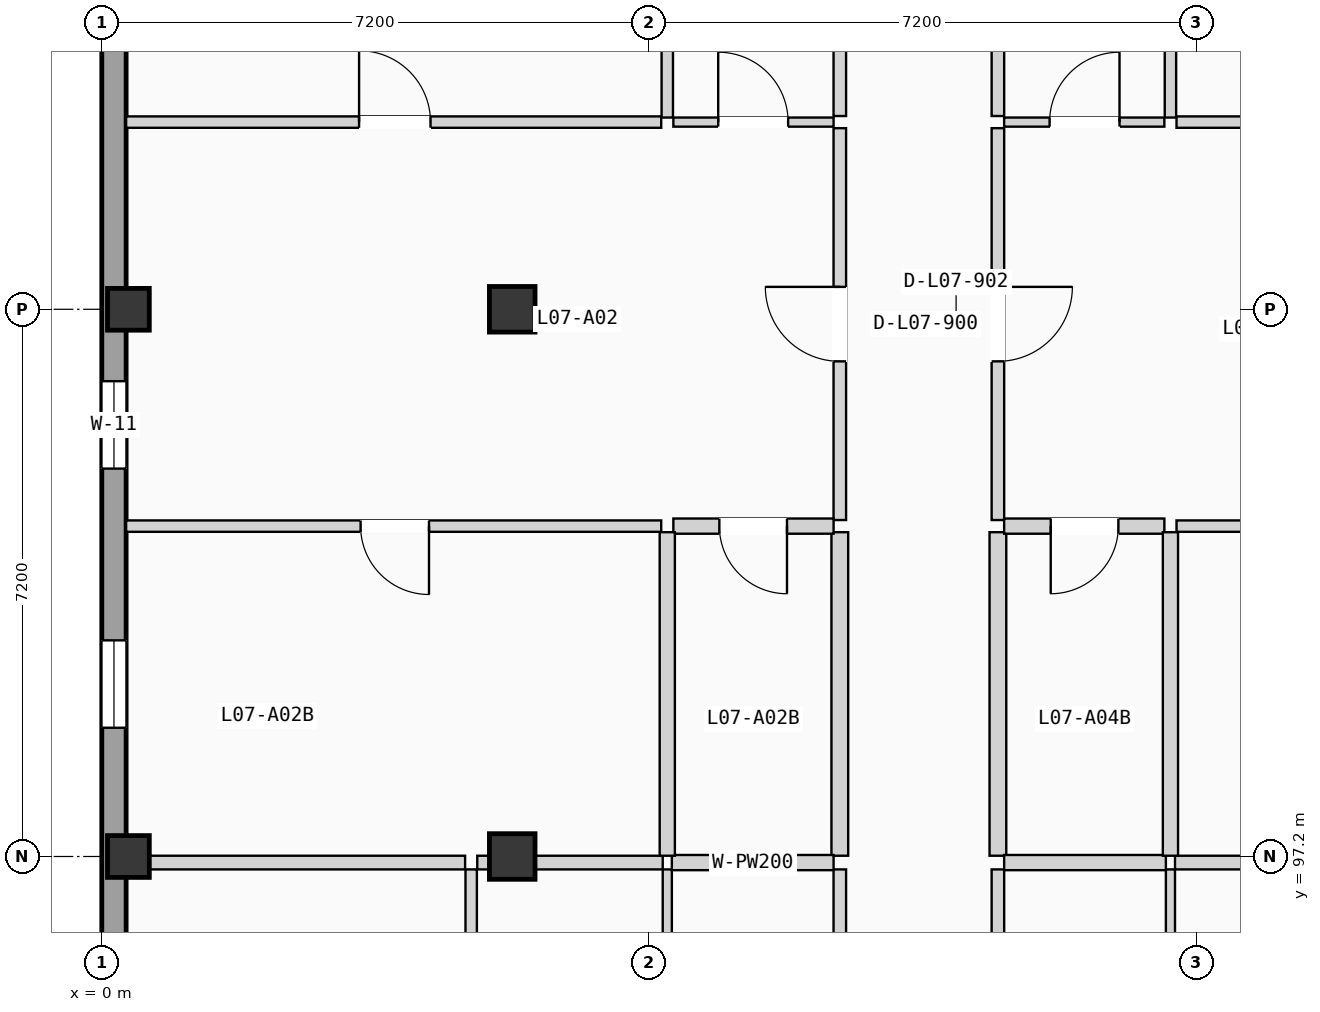
"""IFC4 building model, lengths in metres.
Left out: names, types, materials, properties, quantities, classifications, styles, units other than length and angle.
Written with IfcOpenShell. Run it as: python <this file> out.ifc"""

import sys

from ifc_helpers import new_model, si_unit, direction, frame, frame_2d, origin, origin_2d, place, context, subcontext, project, spatial, rectangle, extrude, element, fill, save


model = new_model("IFC4")
c1 = context("Model", 3, precision=1e-05, world=origin(), true_north=direction((0.0, 1.0)))
c2 = subcontext(c1, "Body", "Model", "MODEL_VIEW")
j1 = project(units=[si_unit("LENGTHUNIT", "METRE"), si_unit("PLANEANGLEUNIT", "RADIAN")], contexts=[c1])
p1 = place(None, origin())
s1 = spatial("IfcSite", under=j1, at=p1, CompositionType="ELEMENT")
p2 = place(p1, origin())
s2 = spatial("IfcBuilding", under=s1, at=p2, CompositionType="ELEMENT")
p3 = place(p2, frame((0.0, 0.0, 24.675)))
s3 = spatial("IfcBuildingStorey", under=s2, at=p3, CompositionType="ELEMENT", Elevation=24.675)
for number, where, z_axis, x_axis in (
    (1, (0.35, 97.2, 0.0), (0.0, 0.0, 1.0), (1.0, 0.0, 0.0)),
    (2, (0.35, 104.4, 0.0), (0.0, 0.0, 1.0), (1.0, 0.0, 0.0)),
):
    element("IfcColumn", number, at=place(p3, frame(where, z_axis=z_axis, x_axis=x_axis)), inside=s3, PredefinedType="COLUMN", context=c2, shape_type="SweptSolid", body=[
        extrude(rectangle(XDim=0.55, YDim=0.55, at=origin_2d()), origin(), (0.0, 0.0, 1.0), 3.15),
    ])
for number, where, z_axis, x_axis in (
    (3, (5.4, 97.2, 0.0), (0.0, 0.0, 1.0), (1.0, 0.0, 0.0)),
    (4, (5.4, 104.4, 0.0), (0.0, 0.0, 1.0), (1.0, 0.0, 0.0)),
):
    element("IfcColumn", number, at=place(p3, frame(where, z_axis=z_axis, x_axis=x_axis)), inside=s3, PredefinedType="COLUMN", context=c2, shape_type="SweptSolid", body=[
        extrude(rectangle(XDim=0.6, YDim=0.6, at=origin_2d()), origin(), (0.0, 0.0, 1.0), 3.15),
    ])
p4 = place(p3, frame((0.16, 68.72, 0.0), z_axis=(0.0, 0.0, 1.0), x_axis=(0.0, 1.0, 0.0)))
e5 = element("IfcWall", 5, at=p4, inside=s3, PredefinedType="SOLIDWALL", context=c2, shape_type="SweptSolid", body=[
    extrude(rectangle(XDim=49.76, YDim=0.32, at=frame_2d((24.88, 0.0))), origin(), (0.0, 0.0, 1.0), 2.9),
])
p5 = place(p4, frame((17.155, 0.0, 0.715)))
e6 = element("IfcOpeningElement", 6, at=p5, cuts=e5, PredefinedType="OPENING", context=c2, shape_type="SweptSolid", body=[
    extrude(rectangle(XDim=1.05, YDim=1.5, at=frame_2d((0.525, 0.75))), frame((0.0, 0.17, 0.0), z_axis=(0.0, -1.0, 0.0), x_axis=(1.0, 0.0, 0.0)), (0.0, 0.0, 1.0), 0.34),
])
p6 = place(p4, frame((10.02, 0.0, 0.565)))
e7 = element("IfcOpeningElement", 7, at=p6, cuts=e5, PredefinedType="OPENING", context=c2, shape_type="SweptSolid", body=[
    extrude(rectangle(XDim=1.05, YDim=1.65, at=frame_2d((0.525, 0.825))), frame((0.0, 0.17, 0.0), z_axis=(0.0, -1.0, 0.0), x_axis=(1.0, 0.0, 0.0)), (0.0, 0.0, 1.0), 0.34),
])
p7 = place(p4, frame((24.405, 0.0, 0.85)))
e8 = element("IfcOpeningElement", 8, at=p7, cuts=e5, PredefinedType="OPENING", context=c2, shape_type="SweptSolid", body=[
    extrude(rectangle(XDim=0.95, YDim=1.2, at=frame_2d((0.475, 0.6))), frame((0.0, 0.17, 0.0), z_axis=(0.0, -1.0, 0.0), x_axis=(1.0, 0.0, 0.0)), (0.0, 0.0, 1.0), 0.34),
])
p8 = place(p4, frame((33.584, 0.0, 0.9)))
e9 = element("IfcOpeningElement", 9, at=p8, cuts=e5, PredefinedType="OPENING", context=c2, shape_type="SweptSolid", body=[
    extrude(rectangle(XDim=1.15, YDim=1.2, at=frame_2d((0.575, 0.6))), frame((0.0, 0.17, 0.0), z_axis=(0.0, -1.0, 0.0), x_axis=(1.0, 0.0, 0.0)), (0.0, 0.0, 1.0), 0.34),
])
p9 = place(p4, frame((30.174, 0.0, 0.865)))
e10 = element("IfcOpeningElement", 10, at=p9, cuts=e5, PredefinedType="OPENING", context=c2, shape_type="SweptSolid", body=[
    extrude(rectangle(XDim=1.15, YDim=1.35, at=frame_2d((0.575, 0.675))), frame((0.0, 0.17, 0.0), z_axis=(0.0, -1.0, 0.0), x_axis=(1.0, 0.0, 0.0)), (0.0, 0.0, 1.0), 0.34),
])
p10 = place(p4, frame((39.776, 0.0, 0.715)))
e11 = element("IfcOpeningElement", 11, at=p10, cuts=e5, PredefinedType="OPENING", context=c2, shape_type="SweptSolid", body=[
    extrude(rectangle(XDim=1.15, YDim=1.5, at=frame_2d((0.575, 0.75))), frame((0.0, 0.17, 0.0), z_axis=(0.0, -1.0, 0.0), x_axis=(1.0, 0.0, 0.0)), (0.0, 0.0, 1.0), 0.34),
])
p11 = place(p3, frame((9.71, 89.13, 0.0), z_axis=(0.0, 0.0, 1.0), x_axis=(0.0, 1.0, 0.0)))
e12 = element("IfcWall", 12, at=p11, inside=s3, PredefinedType="PARTITIONING", context=c2, shape_type="SweptSolid", body=[
    extrude(rectangle(XDim=7.9, YDim=0.165, at=frame_2d((3.95, 0.0))), origin(), (0.0, 0.0, 1.0), 2.87),
])
p12 = place(p3, frame((9.71, 101.627, 0.0), z_axis=(0.0, 0.0, 1.0), x_axis=(0.0, 1.0, 0.0)))
e13 = element("IfcWall", 13, at=p12, inside=s3, PredefinedType="PARTITIONING", context=c2, shape_type="SweptSolid", body=[
    extrude(rectangle(XDim=5.156, YDim=0.165, at=frame_2d((2.578, 0.0))), origin(), (0.0, 0.0, 1.0), 2.87),
])
p13 = place(p12, frame((2.088, 0.0, 0.0)))
e14 = element("IfcOpeningElement", 14, at=p13, cuts=e13, PredefinedType="OPENING", context=c2, shape_type="SweptSolid", body=[
    extrude(rectangle(XDim=0.98, YDim=2.08, at=frame_2d((0.49, 1.04))), frame((0.0, 0.093, 0.0), z_axis=(0.0, -1.0, 0.0), x_axis=(1.0, 0.0, 0.0)), (0.0, 0.0, 1.0), 0.185),
])
p14 = place(p3, frame((9.71, 97.21, 0.0), z_axis=(0.0, 0.0, 1.0), x_axis=(0.0, 1.0, 0.0)))
e15 = element("IfcWall", 15, at=p14, inside=s3, PredefinedType="PLUMBINGWALL", context=c2, shape_type="SweptSolid", body=[
    extrude(rectangle(XDim=4.257, YDim=0.22, at=frame_2d((2.128, 0.0))), origin(), (0.0, 0.0, 1.0), 2.87),
])
p15 = place(p3, frame((9.71, 106.943, 0.0), z_axis=(0.0, 0.0, 1.0), x_axis=(0.0, 1.0, 0.0)))
e16 = element("IfcWall", 16, at=p15, inside=s3, PredefinedType="PARTITIONING", context=c2, shape_type="SweptSolid", body=[
    extrude(rectangle(XDim=4.257, YDim=0.165, at=frame_2d((2.128, 0.0))), origin(), (0.0, 0.0, 1.0), 2.87),
])
p16 = place(p3, frame((11.79, 89.13, 0.0), z_axis=(0.0, 0.0, 1.0), x_axis=(0.0, 1.0, 0.0)))
e17 = element("IfcWall", 17, at=p16, inside=s3, PredefinedType="PARTITIONING", context=c2, shape_type="SweptSolid", body=[
    extrude(rectangle(XDim=7.9, YDim=0.165, at=frame_2d((3.95, 0.0))), origin(), (0.0, 0.0, 1.0), 2.87),
])
p17 = place(p3, frame((11.79, 101.627, 0.0), z_axis=(0.0, 0.0, 1.0), x_axis=(0.0, 1.0, 0.0)))
e18 = element("IfcWall", 18, at=p17, inside=s3, PredefinedType="PARTITIONING", context=c2, shape_type="SweptSolid", body=[
    extrude(rectangle(XDim=5.156, YDim=0.165, at=frame_2d((2.578, 0.0))), origin(), (0.0, 0.0, 1.0), 2.87),
])
p18 = place(p17, frame((2.088, 0.0, 0.0)))
e19 = element("IfcOpeningElement", 19, at=p18, cuts=e18, PredefinedType="OPENING", context=c2, shape_type="SweptSolid", body=[
    extrude(rectangle(XDim=0.98, YDim=2.08, at=frame_2d((0.49, 1.04))), frame((0.0, 0.093, 0.0), z_axis=(0.0, -1.0, 0.0), x_axis=(1.0, 0.0, 0.0)), (0.0, 0.0, 1.0), 0.185),
])
p19 = place(p3, frame((11.79, 97.21, 0.0), z_axis=(0.0, 0.0, 1.0), x_axis=(0.0, 1.0, 0.0)))
e20 = element("IfcWall", 20, at=p19, inside=s3, PredefinedType="PLUMBINGWALL", context=c2, shape_type="SweptSolid", body=[
    extrude(rectangle(XDim=4.257, YDim=0.22, at=frame_2d((2.128, 0.0))), origin(), (0.0, 0.0, 1.0), 2.87),
])
p20 = place(p3, frame((11.79, 106.943, 0.0), z_axis=(0.0, 0.0, 1.0), x_axis=(0.0, 1.0, 0.0)))
e21 = element("IfcWall", 21, at=p20, inside=s3, PredefinedType="PARTITIONING", context=c2, shape_type="SweptSolid", body=[
    extrude(rectangle(XDim=4.257, YDim=0.165, at=frame_2d((2.128, 0.0))), origin(), (0.0, 0.0, 1.0), 2.87),
])
p21 = place(p3, frame((7.44, 89.11, 0.0), z_axis=(0.0, 0.0, 1.0), x_axis=(0.0, 1.0, 0.0)))
e22 = element("IfcWall", 22, at=p21, inside=s3, PredefinedType="PARTITIONING", context=c2, shape_type="SweptSolid", body=[
    extrude(rectangle(XDim=7.92, YDim=0.12, at=frame_2d((3.96, 0.0))), origin(), (0.0, 0.0, 1.0), 2.87),
])
p22 = place(p3, frame((7.5, 97.12, 0.0), z_axis=(0.0, 0.0, 1.0), x_axis=(1.0, 0.0, 0.0)))
e23 = element("IfcWall", 23, at=p22, inside=s3, PredefinedType="PLUMBINGWALL", context=c2, shape_type="SweptSolid", body=[
    extrude(rectangle(XDim=2.128, YDim=0.2, at=frame_2d((1.064, 0.0))), origin(), (0.0, 0.0, 1.0), 2.17),
])
p23 = place(p3, frame((4.86, 89.11, 0.0), z_axis=(0.0, 0.0, 1.0), x_axis=(0.0, 1.0, 0.0)))
e24 = element("IfcWall", 24, at=p23, inside=s3, PredefinedType="PARTITIONING", context=c2, shape_type="SweptSolid", body=[
    extrude(rectangle(XDim=7.92, YDim=0.15, at=frame_2d((3.96, 0.0))), origin(), (0.0, 0.0, 1.0), 2.87),
])
p24 = place(p3, frame((0.32, 97.12, 0.0), z_axis=(0.0, 0.0, 1.0), x_axis=(1.0, 0.0, 0.0)))
e25 = element("IfcWall", 25, at=p24, inside=s3, PredefinedType="PARTITIONING", context=c2, shape_type="SweptSolid", body=[
    extrude(rectangle(XDim=4.46, YDim=0.18, at=frame_2d((2.23, 0.0))), origin(), (0.0, 0.0, 1.0), 2.22),
])
p25 = place(p3, frame((4.94, 97.12, 0.0), z_axis=(0.0, 0.0, 1.0), x_axis=(1.0, 0.0, 0.0)))
e26 = element("IfcWall", 26, at=p25, inside=s3, PredefinedType="PARTITIONING", context=c2, shape_type="SweptSolid", body=[
    extrude(rectangle(XDim=2.44, YDim=0.18, at=frame_2d((1.22, 0.0))), origin(), (0.0, 0.0, 1.0), 2.17),
])
p26 = place(p3, frame((7.52, 101.547, 0.0), z_axis=(0.0, 0.0, 1.0), x_axis=(1.0, 0.0, 0.0)))
e27 = element("IfcWall", 27, at=p26, inside=s3, PredefinedType="PLUMBINGWALL", context=c2, shape_type="SweptSolid", body=[
    extrude(rectangle(XDim=2.108, YDim=0.2, at=frame_2d((1.054, 0.0))), origin(), (0.0, 0.0, 1.0), 2.87),
])
p27 = place(p26, frame((0.605, 0.0, 0.0)))
e28 = element("IfcOpeningElement", 28, at=p27, cuts=e27, PredefinedType="OPENING", context=c2, shape_type="SweptSolid", body=[
    extrude(rectangle(XDim=0.89, YDim=2.03, at=frame_2d((0.445, 1.015))), frame((0.0, 0.11, 0.0), z_axis=(0.0, -1.0, 0.0), x_axis=(1.0, 0.0, 0.0)), (0.0, 0.0, 1.0), 0.22),
])
p28 = place(p3, frame((7.52, 106.863, 0.0), z_axis=(0.0, 0.0, 1.0), x_axis=(1.0, 0.0, 0.0)))
e29 = element("IfcWall", 29, at=p28, inside=s3, PredefinedType="PARTITIONING", context=c2, shape_type="SweptSolid", body=[
    extrude(rectangle(XDim=2.108, YDim=0.12, at=frame_2d((1.054, 0.0))), origin(), (0.0, 0.0, 1.0), 2.87),
])
p29 = place(p28, frame((0.59, 0.0, 0.0)))
e30 = element("IfcOpeningElement", 30, at=p29, cuts=e29, PredefinedType="OPENING", context=c2, shape_type="SweptSolid", body=[
    extrude(rectangle(XDim=0.92, YDim=2.02, at=frame_2d((0.46, 1.01))), frame((0.0, 0.07, 0.0), z_axis=(0.0, -1.0, 0.0), x_axis=(1.0, 0.0, 0.0)), (0.0, 0.0, 1.0), 0.14),
])
p30 = place(p3, frame((0.32, 101.547, 0.0), z_axis=(0.0, 0.0, 1.0), x_axis=(1.0, 0.0, 0.0)))
e31 = element("IfcWall", 31, at=p30, inside=s3, PredefinedType="PARTITIONING", context=c2, shape_type="SweptSolid", body=[
    extrude(rectangle(XDim=7.04, YDim=0.15, at=frame_2d((3.52, 0.0))), origin(), (0.0, 0.0, 1.0), 2.87),
])
p31 = place(p30, frame((3.085, 0.0, 0.0)))
e32 = element("IfcOpeningElement", 32, at=p31, cuts=e31, PredefinedType="OPENING", context=c2, shape_type="SweptSolid", body=[
    extrude(rectangle(XDim=0.9, YDim=2.04, at=frame_2d((0.45, 1.02))), frame((0.0, 0.085, 0.0), z_axis=(0.0, -1.0, 0.0), x_axis=(1.0, 0.0, 0.0)), (0.0, 0.0, 1.0), 0.17),
])
p32 = place(p3, frame((0.32, 106.863, 0.0), z_axis=(0.0, 0.0, 1.0), x_axis=(1.0, 0.0, 0.0)))
e33 = element("IfcWall", 33, at=p32, inside=s3, PredefinedType="PARTITIONING", context=c2, shape_type="SweptSolid", body=[
    extrude(rectangle(XDim=7.04, YDim=0.15, at=frame_2d((3.52, 0.0))), origin(), (0.0, 0.0, 1.0), 2.87),
])
p33 = place(p32, frame((3.065, 0.0, 0.0)))
e34 = element("IfcOpeningElement", 34, at=p33, cuts=e33, PredefinedType="OPENING", context=c2, shape_type="SweptSolid", body=[
    extrude(rectangle(XDim=0.94, YDim=2.06, at=frame_2d((0.47, 1.03))), frame((0.0, 0.085, 0.0), z_axis=(0.0, -1.0, 0.0), x_axis=(1.0, 0.0, 0.0)), (0.0, 0.0, 1.0), 0.17),
])
p34 = place(p3, frame((7.44, 97.21, 0.0), z_axis=(0.0, 0.0, 1.0), x_axis=(0.0, 1.0, 0.0)))
e35 = element("IfcWall", 35, at=p34, inside=s3, PredefinedType="PLUMBINGWALL", context=c2, shape_type="SweptSolid", body=[
    extrude(rectangle(XDim=4.257, YDim=0.2, at=frame_2d((2.128, 0.0))), origin(), (0.0, 0.0, 1.0), 2.87),
])
p35 = place(p3, frame((7.44, 106.923, 0.0), z_axis=(0.0, 0.0, 1.0), x_axis=(0.0, 1.0, 0.0)))
e36 = element("IfcWall", 36, at=p35, inside=s3, PredefinedType="PARTITIONING", context=c2, shape_type="SweptSolid", body=[
    extrude(rectangle(XDim=4.277, YDim=0.15, at=frame_2d((2.138, 0.0))), origin(), (0.0, 0.0, 1.0), 2.87),
])
p36 = place(p3, frame((14.06, 89.11, 0.0), z_axis=(0.0, 0.0, 1.0), x_axis=(0.0, 1.0, 0.0)))
e37 = element("IfcWall", 37, at=p36, inside=s3, PredefinedType="PARTITIONING", context=c2, shape_type="SweptSolid", body=[
    extrude(rectangle(XDim=7.92, YDim=0.12, at=frame_2d((3.96, 0.0))), origin(), (0.0, 0.0, 1.0), 2.87),
])
p37 = place(p3, frame((11.872, 97.12, 0.0), z_axis=(0.0, 0.0, 1.0), x_axis=(1.0, 0.0, 0.0)))
e38 = element("IfcWall", 38, at=p37, inside=s3, PredefinedType="PLUMBINGWALL", context=c2, shape_type="SweptSolid", body=[
    extrude(rectangle(XDim=2.128, YDim=0.2, at=frame_2d((1.064, 0.0))), origin(), (0.0, 0.0, 1.0), 2.17),
])
p38 = place(p3, frame((14.12, 97.12, 0.0), z_axis=(0.0, 0.0, 1.0), x_axis=(1.0, 0.0, 0.0)))
e39 = element("IfcWall", 39, at=p38, inside=s3, PredefinedType="PARTITIONING", context=c2, shape_type="SweptSolid", body=[
    extrude(rectangle(XDim=2.54, YDim=0.18, at=frame_2d((1.27, 0.0))), origin(), (0.0, 0.0, 1.0), 2.17),
])
p39 = place(p3, frame((11.872, 101.547, 0.0), z_axis=(0.0, 0.0, 1.0), x_axis=(1.0, 0.0, 0.0)))
e40 = element("IfcWall", 40, at=p39, inside=s3, PredefinedType="PLUMBINGWALL", context=c2, shape_type="SweptSolid", body=[
    extrude(rectangle(XDim=2.108, YDim=0.2, at=frame_2d((1.054, 0.0))), origin(), (0.0, 0.0, 1.0), 2.87),
])
p40 = place(p39, frame((0.613, 0.0, 0.0)))
e41 = element("IfcOpeningElement", 41, at=p40, cuts=e40, PredefinedType="OPENING", context=c2, shape_type="SweptSolid", body=[
    extrude(rectangle(XDim=0.89, YDim=2.03, at=frame_2d((0.445, 1.015))), frame((0.0, 0.11, 0.0), z_axis=(0.0, -1.0, 0.0), x_axis=(1.0, 0.0, 0.0)), (0.0, 0.0, 1.0), 0.22),
])
p41 = place(p3, frame((11.872, 106.863, 0.0), z_axis=(0.0, 0.0, 1.0), x_axis=(1.0, 0.0, 0.0)))
e42 = element("IfcWall", 42, at=p41, inside=s3, PredefinedType="PARTITIONING", context=c2, shape_type="SweptSolid", body=[
    extrude(rectangle(XDim=2.108, YDim=0.12, at=frame_2d((1.054, 0.0))), origin(), (0.0, 0.0, 1.0), 2.87),
])
p42 = place(p41, frame((0.598, 0.0, 0.0)))
e43 = element("IfcOpeningElement", 43, at=p42, cuts=e42, PredefinedType="OPENING", context=c2, shape_type="SweptSolid", body=[
    extrude(rectangle(XDim=0.92, YDim=2.02, at=frame_2d((0.46, 1.01))), frame((0.0, 0.07, 0.0), z_axis=(0.0, -1.0, 0.0), x_axis=(1.0, 0.0, 0.0)), (0.0, 0.0, 1.0), 0.14),
])
p43 = place(p3, frame((14.14, 101.547, 0.0), z_axis=(0.0, 0.0, 1.0), x_axis=(1.0, 0.0, 0.0)))
e44 = element("IfcWall", 44, at=p43, inside=s3, PredefinedType="PARTITIONING", context=c2, shape_type="SweptSolid", body=[
    extrude(rectangle(XDim=7.14, YDim=0.15, at=frame_2d((3.57, 0.0))), origin(), (0.0, 0.0, 1.0), 2.87),
])
p44 = place(p43, frame((3.015, 0.0, 0.0)))
e45 = element("IfcOpeningElement", 45, at=p44, cuts=e44, PredefinedType="OPENING", context=c2, shape_type="SweptSolid", body=[
    extrude(rectangle(XDim=1.08, YDim=2.1, at=frame_2d((0.54, 1.05))), frame((0.0, 0.085, 0.0), z_axis=(0.0, -1.0, 0.0), x_axis=(1.0, 0.0, 0.0)), (0.0, 0.0, 1.0), 0.17),
])
p45 = place(p3, frame((14.14, 106.863, 0.0), z_axis=(0.0, 0.0, 1.0), x_axis=(1.0, 0.0, 0.0)))
e46 = element("IfcWall", 46, at=p45, inside=s3, PredefinedType="PARTITIONING", context=c2, shape_type="SweptSolid", body=[
    extrude(rectangle(XDim=7.14, YDim=0.15, at=frame_2d((3.57, 0.0))), origin(), (0.0, 0.0, 1.0), 2.87),
])
p46 = place(p45, frame((3.105, 0.0, 0.0)))
e47 = element("IfcOpeningElement", 47, at=p46, cuts=e46, PredefinedType="OPENING", context=c2, shape_type="SweptSolid", body=[
    extrude(rectangle(XDim=0.9, YDim=2.04, at=frame_2d((0.45, 1.02))), frame((0.0, 0.085, 0.0), z_axis=(0.0, -1.0, 0.0), x_axis=(1.0, 0.0, 0.0)), (0.0, 0.0, 1.0), 0.17),
])
p47 = place(p3, frame((14.06, 97.21, 0.0), z_axis=(0.0, 0.0, 1.0), x_axis=(0.0, 1.0, 0.0)))
e48 = element("IfcWall", 48, at=p47, inside=s3, PredefinedType="PLUMBINGWALL", context=c2, shape_type="SweptSolid", body=[
    extrude(rectangle(XDim=4.257, YDim=0.2, at=frame_2d((2.128, 0.0))), origin(), (0.0, 0.0, 1.0), 2.87),
])
p48 = place(p3, frame((14.06, 106.923, 0.0), z_axis=(0.0, 0.0, 1.0), x_axis=(0.0, 1.0, 0.0)))
e49 = element("IfcWall", 49, at=p48, inside=s3, PredefinedType="PARTITIONING", context=c2, shape_type="SweptSolid", body=[
    extrude(rectangle(XDim=4.277, YDim=0.15, at=frame_2d((2.138, 0.0))), origin(), (0.0, 0.0, 1.0), 2.87),
])
p49 = place(p8, origin())
e50 = element("IfcWindow", 50, at=p49, inside=s3, PartitioningType="SINGLE_PANEL", PredefinedType="WINDOW", context=c2, shape_type="SweptSolid", body=[
    extrude(rectangle(XDim=1.15, YDim=1.2, at=frame_2d((0.575, 0.6))), frame((0.0, 0.03, 0.0), z_axis=(0.0, -1.0, 0.0), x_axis=(1.0, 0.0, 0.0)), (0.0, 0.0, 1.0), 0.06),
])
fill(e9, e50)
p50 = place(p9, origin())
e51 = element("IfcWindow", 51, at=p50, inside=s3, PartitioningType="SINGLE_PANEL", PredefinedType="WINDOW", context=c2, shape_type="SweptSolid", body=[
    extrude(rectangle(XDim=1.15, YDim=1.35, at=frame_2d((0.575, 0.675))), frame((0.0, 0.03, 0.0), z_axis=(0.0, -1.0, 0.0), x_axis=(1.0, 0.0, 0.0)), (0.0, 0.0, 1.0), 0.06),
])
fill(e10, e51)
p51 = place(p13, origin())
e52 = element("IfcDoor", 52, at=p51, inside=s3, OperationType="SINGLE_SWING_RIGHT", PredefinedType="DOOR", context=c2, shape_type="SweptSolid", body=[
    extrude(rectangle(XDim=0.98, YDim=2.08, at=frame_2d((0.49, 1.04))), frame((0.0, 0.025, 0.0), z_axis=(0.0, -1.0, 0.0), x_axis=(1.0, 0.0, 0.0)), (0.0, 0.0, 1.0), 0.05),
])
fill(e14, e52)
p52 = place(p18, frame((0.98, 0.0, 0.0), z_axis=(0.0, 0.0, 1.0), x_axis=(-1.0, 0.0, 0.0)))
e53 = element("IfcDoor", 53, at=p52, inside=s3, OperationType="SINGLE_SWING_RIGHT", PredefinedType="DOOR", context=c2, shape_type="SweptSolid", body=[
    extrude(rectangle(XDim=0.98, YDim=2.08, at=frame_2d((0.49, 1.04))), frame((0.0, 0.025, 0.0), z_axis=(0.0, -1.0, 0.0), x_axis=(1.0, 0.0, 0.0)), (0.0, 0.0, 1.0), 0.05),
])
fill(e19, e53)
p53 = place(p27, frame((0.89, 0.0, 0.0), z_axis=(0.0, 0.0, 1.0), x_axis=(-1.0, 0.0, 0.0)))
e54 = element("IfcDoor", 54, at=p53, inside=s3, OperationType="SINGLE_SWING_RIGHT", PredefinedType="DOOR", context=c2, shape_type="SweptSolid", body=[
    extrude(rectangle(XDim=0.89, YDim=2.03, at=frame_2d((0.445, 1.015))), frame((0.0, 0.025, 0.0), z_axis=(0.0, -1.0, 0.0), x_axis=(1.0, 0.0, 0.0)), (0.0, 0.0, 1.0), 0.05),
])
fill(e28, e54)
p54 = place(p29, origin())
e55 = element("IfcDoor", 55, at=p54, inside=s3, OperationType="SINGLE_SWING_LEFT", PredefinedType="DOOR", context=c2, shape_type="SweptSolid", body=[
    extrude(rectangle(XDim=0.92, YDim=2.02, at=frame_2d((0.46, 1.01))), frame((0.0, 0.025, 0.0), z_axis=(0.0, -1.0, 0.0), x_axis=(1.0, 0.0, 0.0)), (0.0, 0.0, 1.0), 0.05),
])
fill(e30, e55)
p55 = place(p31, frame((0.9, 0.0, 0.0), z_axis=(0.0, 0.0, 1.0), x_axis=(-1.0, 0.0, 0.0)))
e56 = element("IfcDoor", 56, at=p55, inside=s3, OperationType="SINGLE_SWING_RIGHT", PredefinedType="DOOR", context=c2, shape_type="SweptSolid", body=[
    extrude(rectangle(XDim=0.9, YDim=2.04, at=frame_2d((0.45, 1.02))), frame((0.0, 0.025, 0.0), z_axis=(0.0, -1.0, 0.0), x_axis=(1.0, 0.0, 0.0)), (0.0, 0.0, 1.0), 0.05),
])
fill(e32, e56)
p56 = place(p33, origin())
e57 = element("IfcDoor", 57, at=p56, inside=s3, OperationType="SINGLE_SWING_LEFT", PredefinedType="DOOR", context=c2, shape_type="SweptSolid", body=[
    extrude(rectangle(XDim=0.94, YDim=2.06, at=frame_2d((0.47, 1.03))), frame((0.0, 0.025, 0.0), z_axis=(0.0, -1.0, 0.0), x_axis=(1.0, 0.0, 0.0)), (0.0, 0.0, 1.0), 0.05),
])
fill(e34, e57)
p57 = place(p40, frame((0.89, 0.0, 0.0), z_axis=(0.0, 0.0, 1.0), x_axis=(-1.0, 0.0, 0.0)))
e58 = element("IfcDoor", 58, at=p57, inside=s3, OperationType="SINGLE_SWING_LEFT", PredefinedType="DOOR", context=c2, shape_type="SweptSolid", body=[
    extrude(rectangle(XDim=0.89, YDim=2.03, at=frame_2d((0.445, 1.015))), frame((0.0, 0.025, 0.0), z_axis=(0.0, -1.0, 0.0), x_axis=(1.0, 0.0, 0.0)), (0.0, 0.0, 1.0), 0.05),
])
fill(e41, e58)
p58 = place(p42, origin())
e59 = element("IfcDoor", 59, at=p58, inside=s3, OperationType="SINGLE_SWING_RIGHT", PredefinedType="DOOR", context=c2, shape_type="SweptSolid", body=[
    extrude(rectangle(XDim=0.92, YDim=2.02, at=frame_2d((0.46, 1.01))), frame((0.0, 0.025, 0.0), z_axis=(0.0, -1.0, 0.0), x_axis=(1.0, 0.0, 0.0)), (0.0, 0.0, 1.0), 0.05),
])
fill(e43, e59)
save(model, sys.argv[1])
